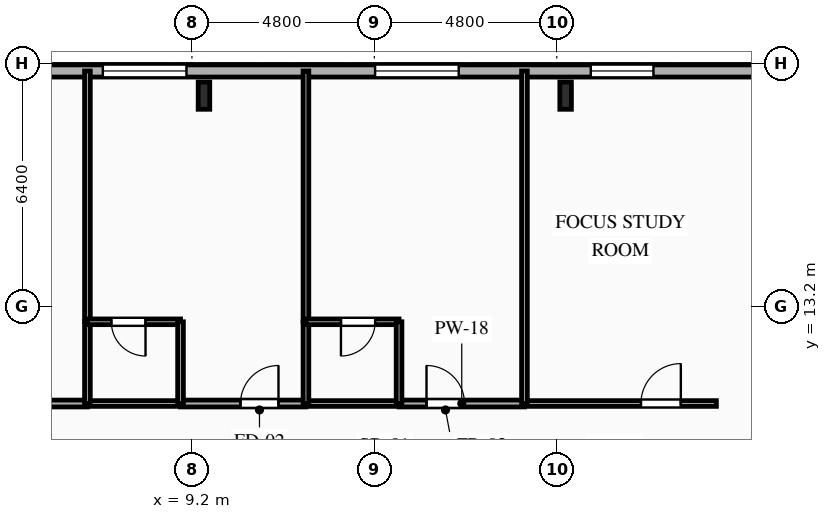
"""IFC4 building model, lengths in metres.
Left out: names, types, materials, properties, quantities, classifications, styles, units other than length and angle.
Written with IfcOpenShell. Run it as: python <this file> out.ifc"""

import sys

from ifc_helpers import new_model, si_unit, direction, frame, frame_2d, origin, origin_2d, place, context, subcontext, project, spatial, rectangle, i_section, extrude, element, fill, save


model = new_model("IFC4")
c1 = context("Model", 3, precision=1e-05, world=origin(), true_north=direction((0.0, 1.0)))
c2 = subcontext(c1, "Body", "Model", "MODEL_VIEW")
j1 = project(units=[si_unit("LENGTHUNIT", "METRE"), si_unit("PLANEANGLEUNIT", "RADIAN")], contexts=[c1])
p1 = place(None, origin())
s1 = spatial("IfcSite", under=j1, at=p1, CompositionType="ELEMENT")
p2 = place(p1, origin())
s2 = spatial("IfcBuilding", under=s1, at=p2, CompositionType="ELEMENT")
p3 = place(p2, frame((0.0, 0.0, 60.5)))
s3 = spatial("IfcBuildingStorey", under=s2, at=p3, CompositionType="ELEMENT", Elevation=60.5)
for number, where, z_axis, x_axis in (
    (1, (19.033, 18.75, 0.0), (0.0, 0.0, 1.0), (1.0, 0.0, 0.0)),
    (2, (9.517, 18.75, 0.0), (0.0, 0.0, 1.0), (1.0, 0.0, 0.0)),
):
    element("IfcColumn", number, at=place(p3, frame(where, z_axis=z_axis, x_axis=x_axis)), inside=s3, PredefinedType="COLUMN", context=c2, shape_type="SweptSolid", body=[
        extrude(i_section(OverallWidth=0.304, OverallDepth=0.716, WebThickness=0.021, FlangeThickness=0.04, FilletRadius=0.027, at=origin_2d()), origin(), (0.0, 0.0, 1.0), 3.35),
    ])
p4 = place(p3, frame((-29.2, 19.4, 0.0), z_axis=(0.0, 0.0, 1.0), x_axis=(1.0, 0.0, 0.0)))
e3 = element("IfcWall", 3, at=p4, inside=s3, PredefinedType="SOLIDWALL", context=c2, shape_type="SweptSolid", body=[
    extrude(rectangle(XDim=58.4, YDim=0.32, at=frame_2d((29.2, 0.0))), origin(), (0.0, 0.0, 1.0), 3.035),
])
p5 = place(p4, frame((8.065, 0.0, 0.85)))
e4 = element("IfcOpeningElement", 4, at=p5, cuts=e3, PredefinedType="OPENING", context=c2, shape_type="SweptSolid", body=[
    extrude(rectangle(XDim=1.65, YDim=1.85, at=frame_2d((0.825, 0.925))), frame((0.0, 0.17, 0.0), z_axis=(0.0, -1.0, 0.0), x_axis=(1.0, 0.0, 0.0)), (0.0, 0.0, 1.0), 0.34),
])
p6 = place(p4, frame((15.97, 0.0, 0.85)))
e5 = element("IfcOpeningElement", 5, at=p6, cuts=e3, PredefinedType="OPENING", context=c2, shape_type="SweptSolid", body=[
    extrude(rectangle(XDim=1.5, YDim=1.85, at=frame_2d((0.75, 0.925))), frame((0.0, 0.17, 0.0), z_axis=(0.0, -1.0, 0.0), x_axis=(1.0, 0.0, 0.0)), (0.0, 0.0, 1.0), 0.34),
])
p7 = place(p4, frame((20.18, 0.0, 0.85)))
e6 = element("IfcOpeningElement", 6, at=p7, cuts=e3, PredefinedType="OPENING", context=c2, shape_type="SweptSolid", body=[
    extrude(rectangle(XDim=2.2, YDim=1.85, at=frame_2d((1.1, 0.925))), frame((0.0, 0.17, 0.0), z_axis=(0.0, -1.0, 0.0), x_axis=(1.0, 0.0, 0.0)), (0.0, 0.0, 1.0), 0.34),
])
p8 = place(p4, frame((25.94, 0.0, 0.85)))
e7 = element("IfcOpeningElement", 7, at=p8, cuts=e3, PredefinedType="OPENING", context=c2, shape_type="SweptSolid", body=[
    extrude(rectangle(XDim=2.2, YDim=1.85, at=frame_2d((1.1, 0.925))), frame((0.0, 0.17, 0.0), z_axis=(0.0, -1.0, 0.0), x_axis=(1.0, 0.0, 0.0)), (0.0, 0.0, 1.0), 0.34),
])
p9 = place(p4, frame((31.7, 0.0, 0.85)))
e8 = element("IfcOpeningElement", 8, at=p9, cuts=e3, PredefinedType="OPENING", context=c2, shape_type="SweptSolid", body=[
    extrude(rectangle(XDim=2.2, YDim=1.85, at=frame_2d((1.1, 0.925))), frame((0.0, 0.17, 0.0), z_axis=(0.0, -1.0, 0.0), x_axis=(1.0, 0.0, 0.0)), (0.0, 0.0, 1.0), 0.34),
])
p10 = place(p4, frame((36.056, 0.0, 0.85)))
e9 = element("IfcOpeningElement", 9, at=p10, cuts=e3, PredefinedType="OPENING", context=c2, shape_type="SweptSolid", body=[
    extrude(rectangle(XDim=2.2, YDim=1.85, at=frame_2d((1.1, 0.925))), frame((0.0, 0.17, 0.0), z_axis=(0.0, -1.0, 0.0), x_axis=(1.0, 0.0, 0.0)), (0.0, 0.0, 1.0), 0.34),
])
p11 = place(p4, frame((43.22, 0.0, 0.85)))
e10 = element("IfcOpeningElement", 10, at=p11, cuts=e3, PredefinedType="OPENING", context=c2, shape_type="SweptSolid", body=[
    extrude(rectangle(XDim=2.2, YDim=1.85, at=frame_2d((1.1, 0.925))), frame((0.0, 0.17, 0.0), z_axis=(0.0, -1.0, 0.0), x_axis=(1.0, 0.0, 0.0)), (0.0, 0.0, 1.0), 0.34),
])
p12 = place(p4, frame((48.895, 0.0, 0.85)))
e11 = element("IfcOpeningElement", 11, at=p12, cuts=e3, PredefinedType="OPENING", context=c2, shape_type="SweptSolid", body=[
    extrude(rectangle(XDim=1.65, YDim=1.85, at=frame_2d((0.825, 0.925))), frame((0.0, 0.17, 0.0), z_axis=(0.0, -1.0, 0.0), x_axis=(1.0, 0.0, 0.0)), (0.0, 0.0, 1.0), 0.34),
])
p13 = place(p3, frame((3.15, 10.65, 0.0), z_axis=(0.0, 0.0, 1.0), x_axis=(1.0, 0.0, 0.0)))
e12 = element("IfcWall", 12, at=p13, inside=s3, PredefinedType="PARTITIONING", context=c2, shape_type="SweptSolid", body=[
    extrude(rectangle(XDim=3.3, YDim=0.18, at=frame_2d((1.65, 0.0))), origin(), (0.0, 0.0, 1.0), 3.035),
])
p14 = place(p13, frame((0.722, 0.0, 0.0)))
e13 = element("IfcOpeningElement", 13, at=p14, cuts=e12, PredefinedType="OPENING", context=c2, shape_type="SweptSolid", body=[
    extrude(rectangle(XDim=1.0, YDim=2.15, at=frame_2d((0.5, 1.075))), frame((0.0, 0.1, 0.0), z_axis=(0.0, -1.0, 0.0), x_axis=(1.0, 0.0, 0.0)), (0.0, 0.0, 1.0), 0.2),
])
p15 = place(p3, frame((8.9, 10.65, 0.0), z_axis=(0.0, 0.0, 1.0), x_axis=(1.0, 0.0, 0.0)))
e14 = element("IfcWall", 14, at=p15, inside=s3, PredefinedType="PARTITIONING", context=c2, shape_type="SweptSolid", body=[
    extrude(rectangle(XDim=3.3, YDim=0.18, at=frame_2d((1.65, 0.0))), origin(), (0.0, 0.0, 1.0), 3.035),
])
p16 = place(p15, frame((1.577, 0.0, 0.0)))
e15 = element("IfcOpeningElement", 15, at=p16, cuts=e14, PredefinedType="OPENING", context=c2, shape_type="SweptSolid", body=[
    extrude(rectangle(XDim=1.0, YDim=2.15, at=frame_2d((0.5, 1.075))), frame((0.0, 0.1, 0.0), z_axis=(0.0, -1.0, 0.0), x_axis=(1.0, 0.0, 0.0)), (0.0, 0.0, 1.0), 0.2),
])
p17 = place(p3, frame((6.45, 10.65, 0.0), z_axis=(0.0, 0.0, 1.0), x_axis=(1.0, 0.0, 0.0)))
e16 = element("IfcWall", 16, at=p17, inside=s3, PredefinedType="PLUMBINGWALL", context=c2, shape_type="SweptSolid", body=[
    extrude(rectangle(XDim=2.45, YDim=0.15, at=frame_2d((1.225, 0.0))), origin(), (0.0, 0.0, 1.0), 3.035),
])
p18 = place(p3, frame((14.65, 10.65, 0.0), z_axis=(0.0, 0.0, 1.0), x_axis=(1.0, 0.0, 0.0)))
e17 = element("IfcWall", 17, at=p18, inside=s3, PredefinedType="PARTITIONING", context=c2, shape_type="SweptSolid", body=[
    extrude(rectangle(XDim=3.3, YDim=0.18, at=frame_2d((1.65, 0.0))), origin(), (0.0, 0.0, 1.0), 3.035),
])
p19 = place(p18, frame((0.722, 0.0, 0.0)))
e18 = element("IfcOpeningElement", 18, at=p19, cuts=e17, PredefinedType="OPENING", context=c2, shape_type="SweptSolid", body=[
    extrude(rectangle(XDim=1.0, YDim=2.15, at=frame_2d((0.5, 1.075))), frame((0.0, 0.1, 0.0), z_axis=(0.0, -1.0, 0.0), x_axis=(1.0, 0.0, 0.0)), (0.0, 0.0, 1.0), 0.2),
])
p20 = place(p3, frame((12.2, 10.65, 0.0), z_axis=(0.0, 0.0, 1.0), x_axis=(1.0, 0.0, 0.0)))
e19 = element("IfcWall", 19, at=p20, inside=s3, PredefinedType="PLUMBINGWALL", context=c2, shape_type="SweptSolid", body=[
    extrude(rectangle(XDim=2.45, YDim=0.15, at=frame_2d((1.225, 0.0))), origin(), (0.0, 0.0, 1.0), 3.035),
])
p21 = place(p3, frame((17.95, 10.65, 0.0), z_axis=(0.0, 0.0, 1.0), x_axis=(1.0, 0.0, 0.0)))
e20 = element("IfcWall", 20, at=p21, inside=s3, PredefinedType="PARTITIONING", context=c2, shape_type="SweptSolid", body=[
    extrude(rectangle(XDim=5.05, YDim=0.15, at=frame_2d((2.525, 0.0))), origin(), (0.0, 0.0, 1.0), 3.035),
])
p22 = place(p21, frame((3.065, 0.0, 0.0)))
e21 = element("IfcOpeningElement", 21, at=p22, cuts=e20, PredefinedType="OPENING", context=c2, shape_type="SweptSolid", body=[
    extrude(rectangle(XDim=1.05, YDim=2.15, at=frame_2d((0.525, 1.075))), frame((0.0, 0.085, 0.0), z_axis=(0.0, -1.0, 0.0), x_axis=(1.0, 0.0, 0.0)), (0.0, 0.0, 1.0), 0.17),
])
p23 = place(p3, frame((6.45, 19.4, 0.0), z_axis=(0.0, 0.0, 1.0), x_axis=(0.0, -1.0, 0.0)))
e22 = element("IfcWall", 22, at=p23, inside=s3, PredefinedType="PARTITIONING", context=c2, shape_type="SweptSolid", body=[
    extrude(rectangle(XDim=6.6, YDim=0.15, at=frame_2d((3.3, 0.0))), origin(), (0.0, 0.0, 1.0), 3.035),
])
p24 = place(p3, frame((6.45, 12.8, 0.0), z_axis=(0.0, 0.0, 1.0), x_axis=(0.0, -1.0, 0.0)))
e23 = element("IfcWall", 23, at=p24, inside=s3, PredefinedType="PLUMBINGWALL", context=c2, shape_type="SweptSolid", body=[
    extrude(rectangle(XDim=2.15, YDim=0.15, at=frame_2d((1.075, 0.0))), origin(), (0.0, 0.0, 1.0), 3.035),
])
p25 = place(p3, frame((8.9, 12.8, 0.0), z_axis=(0.0, 0.0, 1.0), x_axis=(-1.0, 0.0, 0.0)))
e24 = element("IfcWall", 24, at=p25, inside=s3, PredefinedType="PLUMBINGWALL", context=c2, shape_type="SweptSolid", body=[
    extrude(rectangle(XDim=2.45, YDim=0.15, at=frame_2d((1.225, 0.0))), origin(), (0.0, 0.0, 1.0), 3.035),
])
p26 = place(p25, frame((0.921, 0.0, 0.0)))
e25 = element("IfcOpeningElement", 25, at=p26, cuts=e24, PredefinedType="OPENING", context=c2, shape_type="SweptSolid", body=[
    extrude(rectangle(XDim=0.9, YDim=2.1, at=frame_2d((0.45, 1.05))), frame((0.0, 0.085, 0.0), z_axis=(0.0, -1.0, 0.0), x_axis=(1.0, 0.0, 0.0)), (0.0, 0.0, 1.0), 0.17),
])
p27 = place(p3, frame((8.9, 10.65, 0.0), z_axis=(0.0, 0.0, 1.0), x_axis=(0.0, 1.0, 0.0)))
e26 = element("IfcWall", 26, at=p27, inside=s3, PredefinedType="PLUMBINGWALL", context=c2, shape_type="SweptSolid", body=[
    extrude(rectangle(XDim=2.15, YDim=0.15, at=frame_2d((1.075, 0.0))), origin(), (0.0, 0.0, 1.0), 3.035),
])
p28 = place(p3, frame((12.2, 19.4, 0.0), z_axis=(0.0, 0.0, 1.0), x_axis=(0.0, -1.0, 0.0)))
e27 = element("IfcWall", 27, at=p28, inside=s3, PredefinedType="PARTITIONING", context=c2, shape_type="SweptSolid", body=[
    extrude(rectangle(XDim=6.6, YDim=0.15, at=frame_2d((3.3, 0.0))), origin(), (0.0, 0.0, 1.0), 3.035),
])
p29 = place(p3, frame((12.2, 12.8, 0.0), z_axis=(0.0, 0.0, 1.0), x_axis=(0.0, -1.0, 0.0)))
e28 = element("IfcWall", 28, at=p29, inside=s3, PredefinedType="PLUMBINGWALL", context=c2, shape_type="SweptSolid", body=[
    extrude(rectangle(XDim=2.15, YDim=0.15, at=frame_2d((1.075, 0.0))), origin(), (0.0, 0.0, 1.0), 3.035),
])
p30 = place(p3, frame((14.65, 12.8, 0.0), z_axis=(0.0, 0.0, 1.0), x_axis=(-1.0, 0.0, 0.0)))
e29 = element("IfcWall", 29, at=p30, inside=s3, PredefinedType="PLUMBINGWALL", context=c2, shape_type="SweptSolid", body=[
    extrude(rectangle(XDim=2.45, YDim=0.15, at=frame_2d((1.225, 0.0))), origin(), (0.0, 0.0, 1.0), 3.035),
])
p31 = place(p30, frame((0.629, 0.0, 0.0)))
e30 = element("IfcOpeningElement", 30, at=p31, cuts=e29, PredefinedType="OPENING", context=c2, shape_type="SweptSolid", body=[
    extrude(rectangle(XDim=0.9, YDim=2.1, at=frame_2d((0.45, 1.05))), frame((0.0, 0.085, 0.0), z_axis=(0.0, -1.0, 0.0), x_axis=(1.0, 0.0, 0.0)), (0.0, 0.0, 1.0), 0.17),
])
p32 = place(p3, frame((14.65, 10.65, 0.0), z_axis=(0.0, 0.0, 1.0), x_axis=(0.0, 1.0, 0.0)))
e31 = element("IfcWall", 31, at=p32, inside=s3, PredefinedType="PLUMBINGWALL", context=c2, shape_type="SweptSolid", body=[
    extrude(rectangle(XDim=2.15, YDim=0.15, at=frame_2d((1.075, 0.0))), origin(), (0.0, 0.0, 1.0), 3.035),
])
p33 = place(p3, frame((17.95, 19.4, 0.0), z_axis=(0.0, 0.0, 1.0), x_axis=(0.0, -1.0, 0.0)))
e32 = element("IfcWall", 32, at=p33, inside=s3, PredefinedType="PARTITIONING", context=c2, shape_type="SweptSolid", body=[
    extrude(rectangle(XDim=8.75, YDim=0.15, at=frame_2d((4.375, 0.0))), origin(), (0.0, 0.0, 1.0), 3.035),
])
p34 = place(p10, origin())
e33 = element("IfcWindow", 33, at=p34, inside=s3, PartitioningType="SINGLE_PANEL", PredefinedType="WINDOW", context=c2, shape_type="SweptSolid", body=[
    extrude(rectangle(XDim=2.2, YDim=1.85, at=frame_2d((1.1, 0.925))), frame((0.0, 0.03, 0.0), z_axis=(0.0, -1.0, 0.0), x_axis=(1.0, 0.0, 0.0)), (0.0, 0.0, 1.0), 0.06),
])
fill(e9, e33)
p35 = place(p11, origin())
e34 = element("IfcWindow", 34, at=p35, inside=s3, PartitioningType="SINGLE_PANEL", PredefinedType="WINDOW", context=c2, shape_type="SweptSolid", body=[
    extrude(rectangle(XDim=2.2, YDim=1.85, at=frame_2d((1.1, 0.925))), frame((0.0, 0.03, 0.0), z_axis=(0.0, -1.0, 0.0), x_axis=(1.0, 0.0, 0.0)), (0.0, 0.0, 1.0), 0.06),
])
fill(e10, e34)
p36 = place(p12, origin())
e35 = element("IfcWindow", 35, at=p36, inside=s3, PartitioningType="SINGLE_PANEL", PredefinedType="WINDOW", context=c2, shape_type="SweptSolid", body=[
    extrude(rectangle(XDim=1.65, YDim=1.85, at=frame_2d((0.825, 0.925))), frame((0.0, 0.03, 0.0), z_axis=(0.0, -1.0, 0.0), x_axis=(1.0, 0.0, 0.0)), (0.0, 0.0, 1.0), 0.06),
])
fill(e11, e35)
p37 = place(p16, origin())
e36 = element("IfcDoor", 36, at=p37, inside=s3, OperationType="SINGLE_SWING_RIGHT", PredefinedType="DOOR", context=c2, shape_type="SweptSolid", body=[
    extrude(rectangle(XDim=1.0, YDim=2.15, at=frame_2d((0.5, 1.075))), frame((0.0, 0.025, 0.0), z_axis=(0.0, -1.0, 0.0), x_axis=(1.0, 0.0, 0.0)), (0.0, 0.0, 1.0), 0.05),
])
fill(e15, e36)
p38 = place(p19, origin())
e37 = element("IfcDoor", 37, at=p38, inside=s3, OperationType="SINGLE_SWING_LEFT", PredefinedType="DOOR", context=c2, shape_type="SweptSolid", body=[
    extrude(rectangle(XDim=1.0, YDim=2.15, at=frame_2d((0.5, 1.075))), frame((0.0, 0.025, 0.0), z_axis=(0.0, -1.0, 0.0), x_axis=(1.0, 0.0, 0.0)), (0.0, 0.0, 1.0), 0.05),
])
fill(e18, e37)
p39 = place(p22, origin())
e38 = element("IfcDoor", 38, at=p39, inside=s3, OperationType="SINGLE_SWING_RIGHT", PredefinedType="DOOR", context=c2, shape_type="SweptSolid", body=[
    extrude(rectangle(XDim=1.05, YDim=2.15, at=frame_2d((0.525, 1.075))), frame((0.0, 0.025, 0.0), z_axis=(0.0, -1.0, 0.0), x_axis=(1.0, 0.0, 0.0)), (0.0, 0.0, 1.0), 0.05),
])
fill(e21, e38)
p40 = place(p26, origin())
e39 = element("IfcDoor", 39, at=p40, inside=s3, OperationType="SINGLE_SWING_LEFT", PredefinedType="DOOR", context=c2, shape_type="SweptSolid", body=[
    extrude(rectangle(XDim=0.9, YDim=2.1, at=frame_2d((0.45, 1.05))), frame((0.0, 0.025, 0.0), z_axis=(0.0, -1.0, 0.0), x_axis=(1.0, 0.0, 0.0)), (0.0, 0.0, 1.0), 0.05),
])
fill(e25, e39)
p41 = place(p31, origin())
e40 = element("IfcDoor", 40, at=p41, inside=s3, OperationType="SINGLE_SWING_RIGHT", PredefinedType="DOOR", context=c2, shape_type="SweptSolid", body=[
    extrude(rectangle(XDim=0.9, YDim=2.1, at=frame_2d((0.45, 1.05))), frame((0.0, 0.025, 0.0), z_axis=(0.0, -1.0, 0.0), x_axis=(1.0, 0.0, 0.0)), (0.0, 0.0, 1.0), 0.05),
])
fill(e30, e40)
save(model, sys.argv[1])
